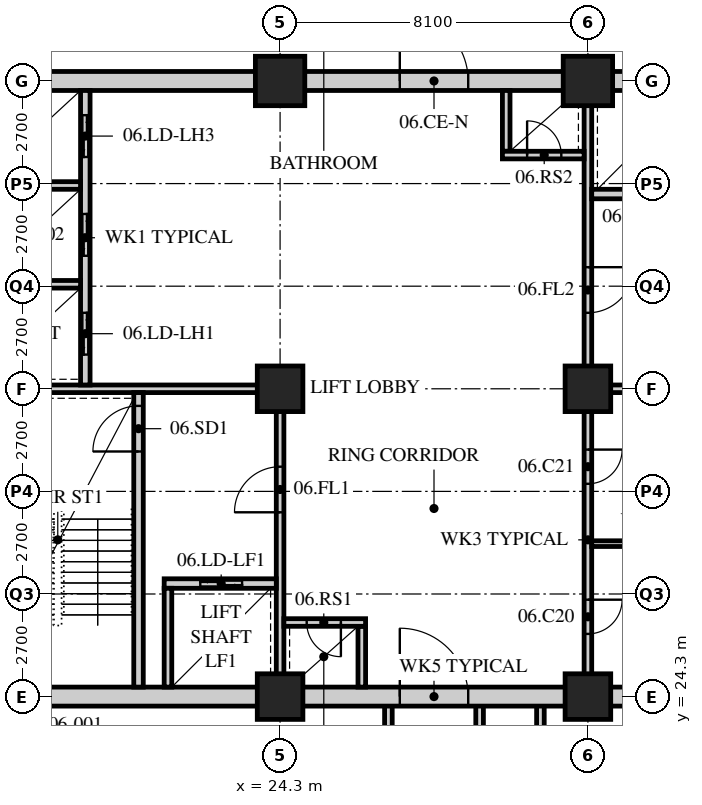
"""IFC4 building model, lengths in metres.
Left out: names, types, materials, properties, quantities, classifications, styles, units other than length and angle.
Written with IfcOpenShell. Run it as: python <this file> out.ifc"""

import sys

from ifc_helpers import new_model, si_unit, direction, frame, frame_2d, origin, origin_2d, place, context, subcontext, project, spatial, rectangle, hollow_rectangle, extrude, element, fill, save


model = new_model("IFC4")
c1 = context("Model", 3, precision=1e-05, world=origin(), true_north=direction((0.0, 1.0)))
c2 = subcontext(c1, "Body", "Model", "MODEL_VIEW")
j1 = project(units=[si_unit("LENGTHUNIT", "METRE"), si_unit("PLANEANGLEUNIT", "RADIAN")], contexts=[c1])
p1 = place(None, origin())
s1 = spatial("IfcSite", under=j1, at=p1, CompositionType="ELEMENT")
p2 = place(p1, origin())
s2 = spatial("IfcBuilding", under=s1, at=p2, CompositionType="ELEMENT")
p3 = place(p2, frame((0.0, 0.0, 33.0)))
s3 = spatial("IfcBuildingStorey", under=s2, at=p3, CompositionType="ELEMENT", Elevation=33.0)
for number, where, z_axis, x_axis in (
    (1, (24.3, 24.3, 0.0), (0.0, 0.0, 1.0), (1.0, 0.0, 0.0)),
    (2, (24.3, 32.4, 0.0), (0.0, 0.0, 1.0), (1.0, 0.0, 0.0)),
):
    element("IfcColumn", number, at=place(p3, frame(where, z_axis=z_axis, x_axis=x_axis)), inside=s3, PredefinedType="COLUMN", context=c2, shape_type="SweptSolid", body=[
        extrude(hollow_rectangle(XDim=1.2, YDim=1.2, WallThickness=0.12, at=origin_2d()), origin(), (0.0, 0.0, 1.0), 3.4),
    ])
p4 = place(p3, frame((24.3, 40.5, 0.0), z_axis=(0.0, 0.0, 1.0), x_axis=(1.0, 0.0, 0.0)))
e3 = element("IfcColumn", 3, at=p4, inside=s3, PredefinedType="COLUMN", context=c2, shape_type="SweptSolid", body=[
    extrude(hollow_rectangle(XDim=1.3, YDim=1.3, WallThickness=0.13, at=origin_2d()), origin(), (0.0, 0.0, 1.0), 3.4),
])
for number, where, z_axis, x_axis in (
    (4, (32.4, 24.3, 0.0), (0.0, 0.0, 1.0), (1.0, 0.0, 0.0)),
    (5, (32.4, 32.4, 0.0), (0.0, 0.0, 1.0), (1.0, 0.0, 0.0)),
):
    element("IfcColumn", number, at=place(p3, frame(where, z_axis=z_axis, x_axis=x_axis)), inside=s3, PredefinedType="COLUMN", context=c2, shape_type="SweptSolid", body=[
        extrude(hollow_rectangle(XDim=1.2, YDim=1.2, WallThickness=0.12, at=origin_2d()), origin(), (0.0, 0.0, 1.0), 3.4),
    ])
p5 = place(p3, frame((32.4, 40.5, 0.0), z_axis=(0.0, 0.0, 1.0), x_axis=(1.0, 0.0, 0.0)))
e6 = element("IfcColumn", 6, at=p5, inside=s3, PredefinedType="COLUMN", context=c2, shape_type="SweptSolid", body=[
    extrude(hollow_rectangle(XDim=1.3, YDim=1.3, WallThickness=0.13, at=origin_2d()), origin(), (0.0, 0.0, 1.0), 3.4),
])
for number, where, z_axis, x_axis in (
    (7, (31.15, 18.0, 0.0), (0.0, 0.0, 1.0), (0.0, 1.0, 0.0)),
    (8, (27.15, 18.0, 0.0), (0.0, 0.0, 1.0), (0.0, 1.0, 0.0)),
    (9, (29.55, 18.0, 0.0), (0.0, 0.0, 1.0), (0.0, 1.0, 0.0)),
):
    element("IfcWall", number, at=place(p3, frame(where, z_axis=z_axis, x_axis=x_axis)), inside=s3, PredefinedType="SOLIDWALL", context=c2, shape_type="SweptSolid", body=[
        extrude(rectangle(XDim=6.3, YDim=0.2, at=frame_2d((3.15, 0.0))), origin(), (0.0, 0.0, 1.0), 3.19),
    ])
p6 = place(p3, frame((15.95, 24.3, 0.0), z_axis=(0.0, 0.0, 1.0), x_axis=(1.0, 0.0, 0.0)))
e10 = element("IfcWall", 10, at=p6, inside=s3, PredefinedType="SOLIDWALL", context=c2, shape_type="SweptSolid", body=[
    extrude(rectangle(XDim=24.8, YDim=0.5, at=frame_2d((12.4, 0.0))), origin(), (0.0, 0.0, 1.0), 2.54),
])
p7 = place(p6, frame((11.5, 0.0, 0.0)))
e11 = element("IfcOpeningElement", 11, at=p7, cuts=e10, PredefinedType="OPENING", context=c2, shape_type="SweptSolid", body=[
    extrude(rectangle(XDim=1.8, YDim=2.4, at=frame_2d((0.9, 1.2))), frame((0.0, 0.26, 0.0), z_axis=(0.0, -1.0, 0.0), x_axis=(1.0, 0.0, 0.0)), (0.0, 0.0, 1.0), 0.52),
])
p8 = place(p3, frame((15.95, 40.5, 0.0), z_axis=(0.0, 0.0, 1.0), x_axis=(1.0, 0.0, 0.0)))
e12 = element("IfcWall", 12, at=p8, inside=s3, PredefinedType="SOLIDWALL", context=c2, shape_type="SweptSolid", body=[
    extrude(rectangle(XDim=24.8, YDim=0.5, at=frame_2d((12.4, 0.0))), origin(), (0.0, 0.0, 1.0), 2.54),
])
p9 = place(p8, frame((11.5, 0.0, 0.0)))
e13 = element("IfcOpeningElement", 13, at=p9, cuts=e12, PredefinedType="OPENING", context=c2, shape_type="SweptSolid", body=[
    extrude(rectangle(XDim=1.8, YDim=2.4, at=frame_2d((0.9, 1.2))), frame((0.0, 0.26, 0.0), z_axis=(0.0, -1.0, 0.0), x_axis=(1.0, 0.0, 0.0)), (0.0, 0.0, 1.0), 0.52),
])
p10 = place(p3, frame((16.45, 32.4, 0.0), z_axis=(0.0, 0.0, 1.0), x_axis=(1.0, 0.0, 0.0)))
e14 = element("IfcWall", 14, at=p10, inside=s3, PredefinedType="SOLIDWALL", context=c2, shape_type="SweptSolid", body=[
    extrude(rectangle(XDim=7.95, YDim=0.2, at=frame_2d((3.975, 0.0))), origin(), (0.0, 0.0, 1.0), 2.578),
])
p11 = place(p3, frame((24.3, 24.55, 0.0), z_axis=(0.0, 0.0, 1.0), x_axis=(0.0, 1.0, 0.0)))
e15 = element("IfcWall", 15, at=p11, inside=s3, PredefinedType="SOLIDWALL", context=c2, shape_type="SweptSolid", body=[
    extrude(rectangle(XDim=7.75, YDim=0.2, at=frame_2d((3.875, 0.0))), origin(), (0.0, 0.0, 1.0), 2.578),
])
p12 = place(p11, frame((4.6, 0.0, 0.0)))
e16 = element("IfcOpeningElement", 16, at=p12, cuts=e15, PredefinedType="OPENING", context=c2, shape_type="SweptSolid", body=[
    extrude(rectangle(XDim=1.2, YDim=2.1, at=frame_2d((0.6, 1.05))), frame((0.0, 0.11, 0.0), z_axis=(0.0, -1.0, 0.0), x_axis=(1.0, 0.0, 0.0)), (0.0, 0.0, 1.0), 0.22),
])
p13 = place(p3, frame((20.575, 24.55, 0.0), z_axis=(0.0, 0.0, 1.0), x_axis=(0.0, 1.0, 0.0)))
e17 = element("IfcWall", 17, at=p13, inside=s3, PredefinedType="SOLIDWALL", context=c2, shape_type="SweptSolid", body=[
    extrude(rectangle(XDim=7.75, YDim=0.25, at=frame_2d((3.875, 0.0))), origin(), (0.0, 0.0, 1.0), 3.19),
])
p14 = place(p13, frame((6.2, 0.0, 0.0)))
e18 = element("IfcOpeningElement", 18, at=p14, cuts=e17, PredefinedType="OPENING", context=c2, shape_type="SweptSolid", body=[
    extrude(rectangle(XDim=1.2, YDim=2.1, at=frame_2d((0.6, 1.05))), frame((0.0, 0.135, 0.0), z_axis=(0.0, -1.0, 0.0), x_axis=(1.0, 0.0, 0.0)), (0.0, 0.0, 1.0), 0.27),
])
p15 = place(p3, frame((21.25, 27.275, 0.0), z_axis=(0.0, 0.0, 1.0), x_axis=(1.0, 0.0, 0.0)))
e19 = element("IfcWall", 19, at=p15, inside=s3, PredefinedType="SOLIDWALL", context=c2, shape_type="SweptSolid", body=[
    extrude(rectangle(XDim=2.95, YDim=0.25, at=frame_2d((1.475, 0.0))), origin(), (0.0, 0.0, 1.0), 3.19),
])
p16 = place(p15, frame((0.95, 0.0, 0.0)))
e20 = element("IfcOpeningElement", 20, at=p16, cuts=e19, PredefinedType="OPENING", context=c2, shape_type="SweptSolid", body=[
    extrude(rectangle(XDim=1.1, YDim=2.4, at=frame_2d((0.55, 1.2))), frame((0.0, 0.135, 0.0), z_axis=(0.0, -1.0, 0.0), x_axis=(1.0, 0.0, 0.0)), (0.0, 0.0, 1.0), 0.27),
])
p17 = place(p3, frame((21.35, 24.55, 0.0), z_axis=(0.0, 0.0, 1.0), x_axis=(0.0, 1.0, 0.0)))
e21 = element("IfcWall", 21, at=p17, inside=s3, PredefinedType="SOLIDWALL", context=c2, shape_type="SweptSolid", body=[
    extrude(rectangle(XDim=2.6, YDim=0.2, at=frame_2d((1.3, 0.0))), origin(), (0.0, 0.0, 1.0), 3.19),
])
p18 = place(p3, frame((19.175, 32.5, 0.0), z_axis=(0.0, 0.0, 1.0), x_axis=(0.0, 1.0, 0.0)))
e22 = element("IfcWall", 22, at=p18, inside=s3, PredefinedType="SOLIDWALL", context=c2, shape_type="SweptSolid", body=[
    extrude(rectangle(XDim=7.75, YDim=0.25, at=frame_2d((3.875, 0.0))), origin(), (0.0, 0.0, 1.0), 3.19),
])
p19 = place(p18, frame((0.8, 0.0, 0.0)))
e23 = element("IfcOpeningElement", 23, at=p19, cuts=e22, PredefinedType="OPENING", context=c2, shape_type="SweptSolid", body=[
    extrude(rectangle(XDim=1.1, YDim=2.4, at=frame_2d((0.55, 1.2))), frame((0.0, 0.135, 0.0), z_axis=(0.0, -1.0, 0.0), x_axis=(1.0, 0.0, 0.0)), (0.0, 0.0, 1.0), 0.27),
])
p20 = place(p18, frame((3.4, 0.0, 0.0)))
e24 = element("IfcOpeningElement", 24, at=p20, cuts=e22, PredefinedType="OPENING", context=c2, shape_type="SweptSolid", body=[
    extrude(rectangle(XDim=1.1, YDim=2.4, at=frame_2d((0.55, 1.2))), frame((0.0, 0.135, 0.0), z_axis=(0.0, -1.0, 0.0), x_axis=(1.0, 0.0, 0.0)), (0.0, 0.0, 1.0), 0.27),
])
p21 = place(p18, frame((6.0, 0.0, 0.0)))
e25 = element("IfcOpeningElement", 25, at=p21, cuts=e22, PredefinedType="OPENING", context=c2, shape_type="SweptSolid", body=[
    extrude(rectangle(XDim=1.1, YDim=2.4, at=frame_2d((0.55, 1.2))), frame((0.0, 0.135, 0.0), z_axis=(0.0, -1.0, 0.0), x_axis=(1.0, 0.0, 0.0)), (0.0, 0.0, 1.0), 0.27),
])
for number, where, z_axis, x_axis in (
    (26, (16.45, 35.15, 0.0), (0.0, 0.0, 1.0), (1.0, 0.0, 0.0)),
    (27, (16.45, 37.75, 0.0), (0.0, 0.0, 1.0), (1.0, 0.0, 0.0)),
):
    element("IfcWall", number, at=place(p3, frame(where, z_axis=z_axis, x_axis=x_axis)), inside=s3, PredefinedType="SOLIDWALL", context=c2, shape_type="SweptSolid", body=[
        extrude(rectangle(XDim=2.6, YDim=0.2, at=frame_2d((1.3, 0.0))), origin(), (0.0, 0.0, 1.0), 3.19),
    ])
p22 = place(p3, frame((26.45, 24.55, 0.0), z_axis=(0.0, 0.0, 1.0), x_axis=(0.0, 1.0, 0.0)))
e28 = element("IfcWall", 28, at=p22, inside=s3, PredefinedType="SOLIDWALL", context=c2, shape_type="SweptSolid", body=[
    extrude(rectangle(XDim=1.6, YDim=0.2, at=frame_2d((0.8, 0.0))), origin(), (0.0, 0.0, 1.0), 3.19),
])
p23 = place(p3, frame((24.4, 26.25, 0.0), z_axis=(0.0, 0.0, 1.0), x_axis=(1.0, 0.0, 0.0)))
e29 = element("IfcWall", 29, at=p23, inside=s3, PredefinedType="SOLIDWALL", context=c2, shape_type="SweptSolid", body=[
    extrude(rectangle(XDim=2.15, YDim=0.2, at=frame_2d((1.075, 0.0))), origin(), (0.0, 0.0, 1.0), 3.19),
])
p24 = place(p23, frame((0.6, 0.0, 0.0)))
e30 = element("IfcOpeningElement", 30, at=p24, cuts=e29, PredefinedType="OPENING", context=c2, shape_type="SweptSolid", body=[
    extrude(rectangle(XDim=0.9, YDim=2.1, at=frame_2d((0.45, 1.05))), frame((0.0, 0.11, 0.0), z_axis=(0.0, -1.0, 0.0), x_axis=(1.0, 0.0, 0.0)), (0.0, 0.0, 1.0), 0.22),
])
p25 = place(p3, frame((32.3, 32.4, 0.0), z_axis=(0.0, 0.0, 1.0), x_axis=(1.0, 0.0, 0.0)))
e31 = element("IfcWall", 31, at=p25, inside=s3, PredefinedType="SOLIDWALL", context=c2, shape_type="SweptSolid", body=[
    extrude(rectangle(XDim=7.95, YDim=0.2, at=frame_2d((3.975, 0.0))), origin(), (0.0, 0.0, 1.0), 2.578),
])
p26 = place(p3, frame((32.4, 32.5, 0.0), z_axis=(0.0, 0.0, 1.0), x_axis=(0.0, 1.0, 0.0)))
e32 = element("IfcWall", 32, at=p26, inside=s3, PredefinedType="SOLIDWALL", context=c2, shape_type="SweptSolid", body=[
    extrude(rectangle(XDim=7.75, YDim=0.2, at=frame_2d((3.875, 0.0))), origin(), (0.0, 0.0, 1.0), 2.578),
])
p27 = place(p26, frame((1.9, 0.0, 0.0)))
e33 = element("IfcOpeningElement", 33, at=p27, cuts=e32, PredefinedType="OPENING", context=c2, shape_type="SweptSolid", body=[
    extrude(rectangle(XDim=1.2, YDim=2.1, at=frame_2d((0.6, 1.05))), frame((0.0, 0.11, 0.0), z_axis=(0.0, -1.0, 0.0), x_axis=(1.0, 0.0, 0.0)), (0.0, 0.0, 1.0), 0.22),
])
p28 = place(p3, frame((32.5, 37.525, 0.0), z_axis=(0.0, 0.0, 1.0), x_axis=(1.0, 0.0, 0.0)))
e34 = element("IfcWall", 34, at=p28, inside=s3, PredefinedType="SOLIDWALL", context=c2, shape_type="SweptSolid", body=[
    extrude(rectangle(XDim=2.95, YDim=0.25, at=frame_2d((1.475, 0.0))), origin(), (0.0, 0.0, 1.0), 3.19),
])
p29 = place(p28, frame((0.9, 0.0, 0.0)))
e35 = element("IfcOpeningElement", 35, at=p29, cuts=e34, PredefinedType="OPENING", context=c2, shape_type="SweptSolid", body=[
    extrude(rectangle(XDim=1.1, YDim=2.4, at=frame_2d((0.55, 1.2))), frame((0.0, 0.135, 0.0), z_axis=(0.0, -1.0, 0.0), x_axis=(1.0, 0.0, 0.0)), (0.0, 0.0, 1.0), 0.27),
])
p30 = place(p3, frame((30.25, 38.65, 0.0), z_axis=(0.0, 0.0, 1.0), x_axis=(0.0, 1.0, 0.0)))
e36 = element("IfcWall", 36, at=p30, inside=s3, PredefinedType="SOLIDWALL", context=c2, shape_type="SweptSolid", body=[
    extrude(rectangle(XDim=1.6, YDim=0.2, at=frame_2d((0.8, 0.0))), origin(), (0.0, 0.0, 1.0), 3.19),
])
p31 = place(p3, frame((30.15, 38.55, 0.0), z_axis=(0.0, 0.0, 1.0), x_axis=(1.0, 0.0, 0.0)))
e37 = element("IfcWall", 37, at=p31, inside=s3, PredefinedType="SOLIDWALL", context=c2, shape_type="SweptSolid", body=[
    extrude(rectangle(XDim=2.15, YDim=0.2, at=frame_2d((1.075, 0.0))), origin(), (0.0, 0.0, 1.0), 3.19),
])
p32 = place(p31, frame((0.65, 0.0, 0.0)))
e38 = element("IfcOpeningElement", 38, at=p32, cuts=e37, PredefinedType="OPENING", context=c2, shape_type="SweptSolid", body=[
    extrude(rectangle(XDim=0.9, YDim=2.1, at=frame_2d((0.45, 1.05))), frame((0.0, 0.11, 0.0), z_axis=(0.0, -1.0, 0.0), x_axis=(1.0, 0.0, 0.0)), (0.0, 0.0, 1.0), 0.22),
])
p33 = place(p3, frame((32.4, 24.55, 0.0), z_axis=(0.0, 0.0, 1.0), x_axis=(0.0, 1.0, 0.0)))
e39 = element("IfcWall", 39, at=p33, inside=s3, PredefinedType="PARTITIONING", context=c2, shape_type="SweptSolid", body=[
    extrude(rectangle(XDim=7.75, YDim=0.2, at=frame_2d((3.875, 0.0))), origin(), (0.0, 0.0, 1.0), 2.578),
])
p34 = place(p33, frame((1.4, 0.0, 0.0)))
e40 = element("IfcOpeningElement", 40, at=p34, cuts=e39, PredefinedType="OPENING", context=c2, shape_type="SweptSolid", body=[
    extrude(rectangle(XDim=0.9, YDim=2.1, at=frame_2d((0.45, 1.05))), frame((0.0, 0.11, 0.0), z_axis=(0.0, -1.0, 0.0), x_axis=(1.0, 0.0, 0.0)), (0.0, 0.0, 1.0), 0.22),
])
p35 = place(p33, frame((5.35, 0.0, 0.0)))
e41 = element("IfcOpeningElement", 41, at=p35, cuts=e39, PredefinedType="OPENING", context=c2, shape_type="SweptSolid", body=[
    extrude(rectangle(XDim=0.9, YDim=2.1, at=frame_2d((0.45, 1.05))), frame((0.0, 0.11, 0.0), z_axis=(0.0, -1.0, 0.0), x_axis=(1.0, 0.0, 0.0)), (0.0, 0.0, 1.0), 0.22),
])
p36 = place(p3, frame((32.5, 28.325, 0.0), z_axis=(0.0, 0.0, 1.0), x_axis=(1.0, 0.0, 0.0)))
e42 = element("IfcWall", 42, at=p36, inside=s3, PredefinedType="PARTITIONING", context=c2, shape_type="SweptSolid", body=[
    extrude(rectangle(XDim=4.9, YDim=0.15, at=frame_2d((2.45, 0.0))), origin(), (0.0, 0.0, 1.0), 3.19),
])
p37 = place(p34, origin())
e43 = element("IfcDoor", 43, at=p37, inside=s3, OperationType="SINGLE_SWING_LEFT", PredefinedType="DOOR", context=c2, shape_type="SweptSolid", body=[
    extrude(rectangle(XDim=0.9, YDim=2.1, at=frame_2d((0.45, 1.05))), frame((0.0, 0.025, 0.0), z_axis=(0.0, -1.0, 0.0), x_axis=(1.0, 0.0, 0.0)), (0.0, 0.0, 1.0), 0.05),
])
fill(e40, e43)
p38 = place(p35, origin())
e44 = element("IfcDoor", 44, at=p38, inside=s3, OperationType="SINGLE_SWING_LEFT", PredefinedType="DOOR", context=c2, shape_type="SweptSolid", body=[
    extrude(rectangle(XDim=0.9, YDim=2.1, at=frame_2d((0.45, 1.05))), frame((0.0, 0.025, 0.0), z_axis=(0.0, -1.0, 0.0), x_axis=(1.0, 0.0, 0.0)), (0.0, 0.0, 1.0), 0.05),
])
fill(e41, e44)
p39 = place(p14, origin())
e45 = element("IfcDoor", 45, at=p39, inside=s3, OperationType="SINGLE_SWING_LEFT", PredefinedType="DOOR", context=c2, shape_type="SweptSolid", body=[
    extrude(rectangle(XDim=1.2, YDim=2.1, at=frame_2d((0.6, 1.05))), frame((0.0, 0.025, 0.0), z_axis=(0.0, -1.0, 0.0), x_axis=(1.0, 0.0, 0.0)), (0.0, 0.0, 1.0), 0.05),
])
fill(e18, e45)
p40 = place(p12, origin())
e46 = element("IfcDoor", 46, at=p40, inside=s3, OperationType="SINGLE_SWING_LEFT", PredefinedType="DOOR", context=c2, shape_type="SweptSolid", body=[
    extrude(rectangle(XDim=1.2, YDim=2.1, at=frame_2d((0.6, 1.05))), frame((0.0, 0.025, 0.0), z_axis=(0.0, -1.0, 0.0), x_axis=(1.0, 0.0, 0.0)), (0.0, 0.0, 1.0), 0.05),
])
fill(e16, e46)
p41 = place(p24, origin())
e47 = element("IfcDoor", 47, at=p41, inside=s3, OperationType="SINGLE_SWING_LEFT", PredefinedType="DOOR", context=c2, shape_type="SweptSolid", body=[
    extrude(rectangle(XDim=0.9, YDim=2.1, at=frame_2d((0.45, 1.05))), frame((0.0, 0.025, 0.0), z_axis=(0.0, -1.0, 0.0), x_axis=(1.0, 0.0, 0.0)), (0.0, 0.0, 1.0), 0.05),
])
fill(e30, e47)
p42 = place(p27, origin())
e48 = element("IfcDoor", 48, at=p42, inside=s3, OperationType="SINGLE_SWING_LEFT", PredefinedType="DOOR", context=c2, shape_type="SweptSolid", body=[
    extrude(rectangle(XDim=1.2, YDim=2.1, at=frame_2d((0.6, 1.05))), frame((0.0, 0.025, 0.0), z_axis=(0.0, -1.0, 0.0), x_axis=(1.0, 0.0, 0.0)), (0.0, 0.0, 1.0), 0.05),
])
fill(e33, e48)
p43 = place(p32, origin())
e49 = element("IfcDoor", 49, at=p43, inside=s3, OperationType="SINGLE_SWING_LEFT", PredefinedType="DOOR", context=c2, shape_type="SweptSolid", body=[
    extrude(rectangle(XDim=0.9, YDim=2.1, at=frame_2d((0.45, 1.05))), frame((0.0, 0.025, 0.0), z_axis=(0.0, -1.0, 0.0), x_axis=(1.0, 0.0, 0.0)), (0.0, 0.0, 1.0), 0.05),
])
fill(e38, e49)
p44 = place(p19, origin())
e50 = element("IfcDoor", 50, at=p44, inside=s3, OperationType="DOUBLE_DOOR_SLIDING", PredefinedType="DOOR", context=c2, shape_type="SweptSolid", body=[
    extrude(rectangle(XDim=1.1, YDim=2.4, at=frame_2d((0.55, 1.2))), frame((0.0, 0.025, 0.0), z_axis=(0.0, -1.0, 0.0), x_axis=(1.0, 0.0, 0.0)), (0.0, 0.0, 1.0), 0.05),
])
fill(e23, e50)
p45 = place(p20, origin())
e51 = element("IfcDoor", 51, at=p45, inside=s3, OperationType="DOUBLE_DOOR_SLIDING", PredefinedType="DOOR", context=c2, shape_type="SweptSolid", body=[
    extrude(rectangle(XDim=1.1, YDim=2.4, at=frame_2d((0.55, 1.2))), frame((0.0, 0.025, 0.0), z_axis=(0.0, -1.0, 0.0), x_axis=(1.0, 0.0, 0.0)), (0.0, 0.0, 1.0), 0.05),
])
fill(e24, e51)
p46 = place(p21, origin())
e52 = element("IfcDoor", 52, at=p46, inside=s3, OperationType="DOUBLE_DOOR_SLIDING", PredefinedType="DOOR", context=c2, shape_type="SweptSolid", body=[
    extrude(rectangle(XDim=1.1, YDim=2.4, at=frame_2d((0.55, 1.2))), frame((0.0, 0.025, 0.0), z_axis=(0.0, -1.0, 0.0), x_axis=(1.0, 0.0, 0.0)), (0.0, 0.0, 1.0), 0.05),
])
fill(e25, e52)
p47 = place(p16, origin())
e53 = element("IfcDoor", 53, at=p47, inside=s3, OperationType="DOUBLE_DOOR_SLIDING", PredefinedType="DOOR", context=c2, shape_type="SweptSolid", body=[
    extrude(rectangle(XDim=1.1, YDim=2.4, at=frame_2d((0.55, 1.2))), frame((0.0, 0.025, 0.0), z_axis=(0.0, -1.0, 0.0), x_axis=(1.0, 0.0, 0.0)), (0.0, 0.0, 1.0), 0.05),
])
fill(e20, e53)
p48 = place(p7, origin())
e54 = element("IfcDoor", 54, at=p48, inside=s3, OperationType="DOUBLE_DOOR_SINGLE_SWING", PredefinedType="DOOR", context=c2, shape_type="SweptSolid", body=[
    extrude(rectangle(XDim=1.8, YDim=2.4, at=frame_2d((0.9, 1.2))), frame((0.0, 0.025, 0.0), z_axis=(0.0, -1.0, 0.0), x_axis=(1.0, 0.0, 0.0)), (0.0, 0.0, 1.0), 0.05),
])
fill(e11, e54)
p49 = place(p9, origin())
e55 = element("IfcDoor", 55, at=p49, inside=s3, OperationType="DOUBLE_DOOR_SINGLE_SWING", PredefinedType="DOOR", context=c2, shape_type="SweptSolid", body=[
    extrude(rectangle(XDim=1.8, YDim=2.4, at=frame_2d((0.9, 1.2))), frame((0.0, 0.025, 0.0), z_axis=(0.0, -1.0, 0.0), x_axis=(1.0, 0.0, 0.0)), (0.0, 0.0, 1.0), 0.05),
])
fill(e13, e55)
save(model, sys.argv[1])
